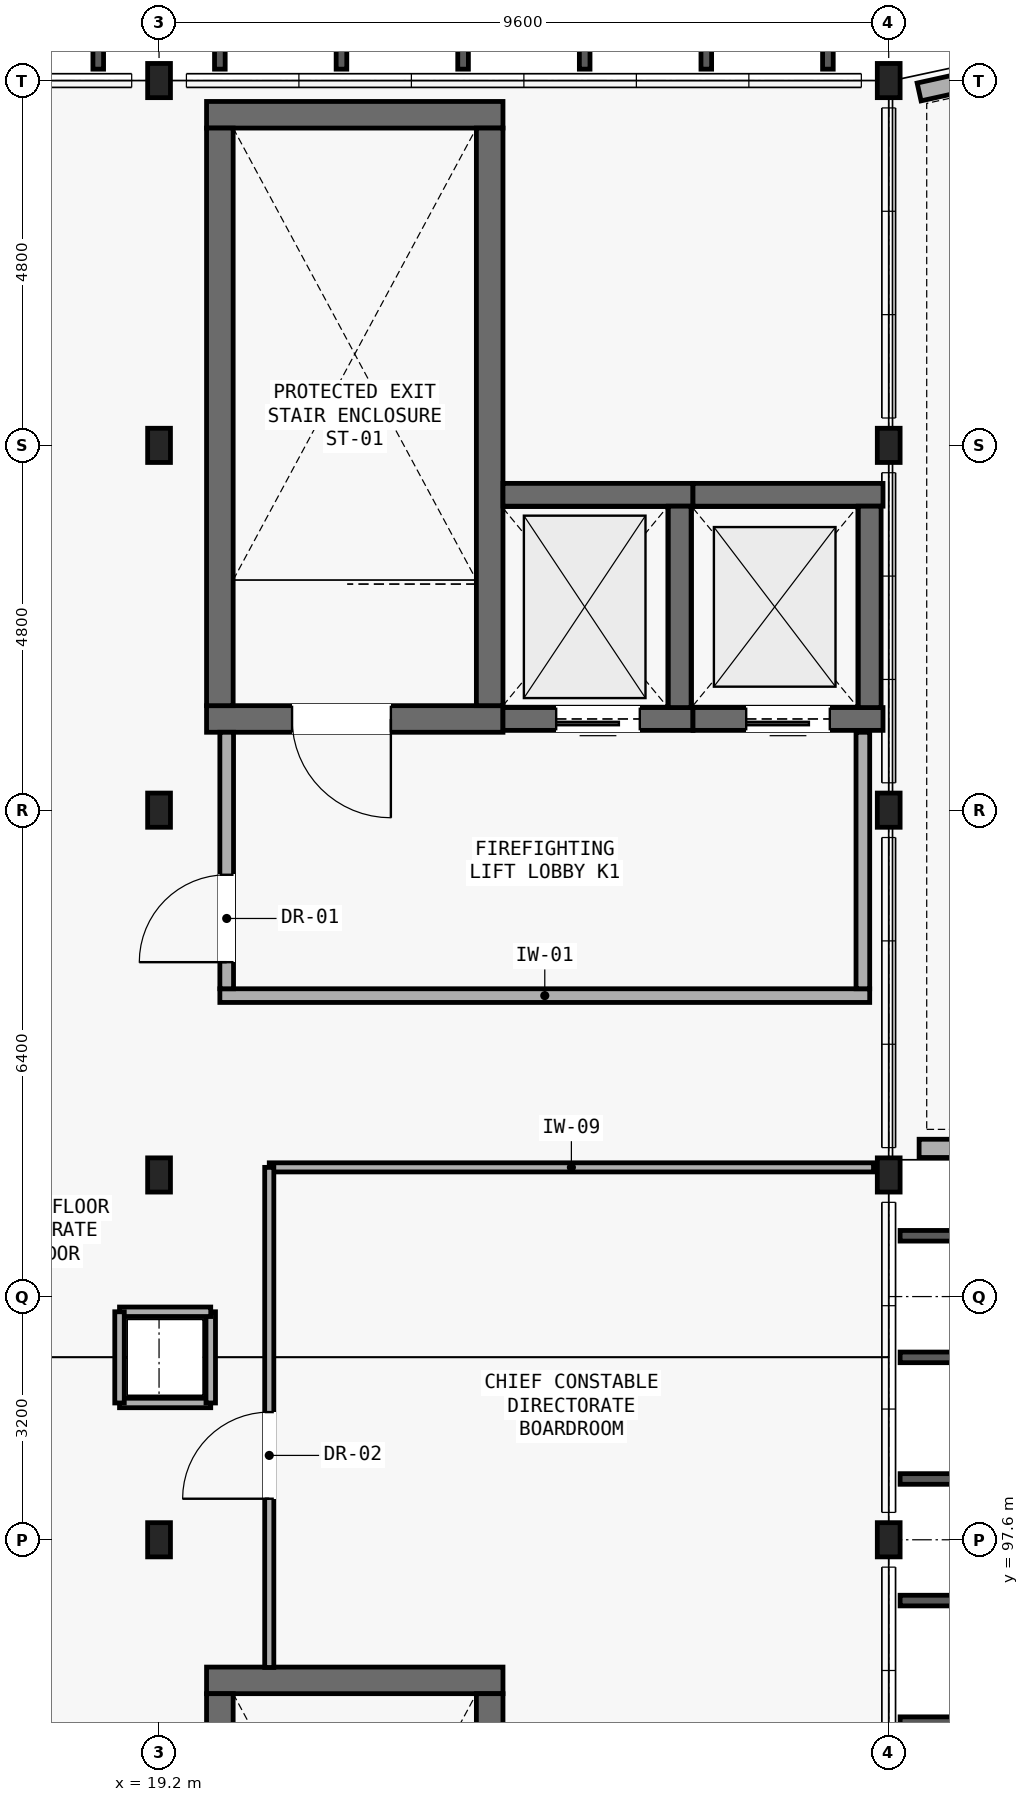
"""IFC4 building model, lengths in metres.
Left out: names, types, materials, properties, quantities, classifications, styles, units other than length and angle.
Written with IfcOpenShell. Run it as: python <this file> out.ifc"""

import sys

from ifc_helpers import new_model, si_unit, direction, frame, frame_2d, origin, origin_2d, place, context, subcontext, project, spatial, rectangle, i_section, extrude, element, fill, save


model = new_model("IFC4")
c1 = context("Model", 3, precision=1e-05, world=origin(), true_north=direction((0.0, 1.0)))
c2 = subcontext(c1, "Body", "Model", "MODEL_VIEW")
j1 = project(units=[si_unit("LENGTHUNIT", "METRE"), si_unit("PLANEANGLEUNIT", "RADIAN")], contexts=[c1])
p1 = place(None, origin())
s1 = spatial("IfcSite", under=j1, at=p1, CompositionType="ELEMENT")
p2 = place(p1, origin())
s2 = spatial("IfcBuilding", under=s1, at=p2, CompositionType="ELEMENT")
p3 = place(p2, frame((0.0, 0.0, 31.15)))
s3 = spatial("IfcBuildingStorey", under=s2, at=p3, CompositionType="ELEMENT", Elevation=31.15)
for number, where, z_axis, x_axis in (
    (1, (28.8, 97.6, 0.0), (0.0, 0.0, 1.0), (1.0, 0.0, 0.0)),
    (2, (28.8, 102.4, 0.0), (0.0, 0.0, 1.0), (1.0, 0.0, 0.0)),
    (3, (28.8, 107.2, 0.0), (0.0, 0.0, 1.0), (1.0, 0.0, 0.0)),
    (4, (28.8, 112.0, 0.0), (0.0, 0.0, 1.0), (1.0, 0.0, 0.0)),
    (5, (28.8, 116.8, 0.0), (0.0, 0.0, 1.0), (1.0, 0.0, 0.0)),
    (6, (19.2, 116.8, 0.0), (0.0, 0.0, 1.0), (1.0, 0.0, 0.0)),
    (7, (19.2, 97.6, 0.0), (0.0, 0.0, 1.0), (1.0, 0.0, 0.0)),
    (8, (19.2, 102.4, 0.0), (0.0, 0.0, 1.0), (1.0, 0.0, 0.0)),
    (9, (19.2, 107.2, 0.0), (0.0, 0.0, 1.0), (1.0, 0.0, 0.0)),
    (10, (19.2, 112.0, 0.0), (0.0, 0.0, 1.0), (1.0, 0.0, 0.0)),
):
    element("IfcColumn", number, at=place(p3, frame(where, z_axis=z_axis, x_axis=x_axis)), inside=s3, PredefinedType="COLUMN", context=c2, shape_type="SweptSolid", body=[
        extrude(i_section(OverallWidth=0.3, OverallDepth=0.45, WebThickness=0.014, FlangeThickness=0.026, FilletRadius=0.027, at=origin_2d()), origin(), (0.0, 0.0, 1.0), 4.9),
    ])
p4 = place(p3, frame((29.2, 102.75, 0.0), z_axis=(0.0, 0.0, 1.0), x_axis=(1.0, 0.0, 0.0)))
e11 = element("IfcWall", 11, at=p4, inside=s3, PredefinedType="PARAPET", context=c2, shape_type="SweptSolid", body=[
    extrude(rectangle(XDim=47.4, YDim=0.24, at=frame_2d((23.7, 0.0))), origin(), (0.0, 0.0, 1.0), 1.1),
])
p5 = place(p3, frame((38.4, 118.68, 0.0), z_axis=(0.0, 0.0, 1.0), x_axis=(-0.97650974299, -0.215473250881, 0.0)))
e12 = element("IfcWall", 12, at=p5, inside=s3, PredefinedType="PARAPET", context=c2, shape_type="SweptSolid", body=[
    extrude(rectangle(XDim=9.421, YDim=0.24, at=frame_2d((4.71, 0.0))), origin(), (0.0, 0.0, 1.0), 1.1),
])
p6 = place(p3, frame((19.825, 108.4, 0.0), z_axis=(0.0, 0.0, 1.0), x_axis=(1.0, 0.0, 0.0)))
e13 = element("IfcWall", 13, at=p6, inside=s3, PredefinedType="SHEAR", context=c2, shape_type="SweptSolid", body=[
    extrude(rectangle(XDim=3.9, YDim=0.35, at=frame_2d((1.95, 0.0))), origin(), (0.0, 0.0, 1.0), 4.71),
])
p7 = place(p6, frame((1.125, 0.0, 0.0)))
e14 = element("IfcOpeningElement", 14, at=p7, cuts=e13, PredefinedType="OPENING", context=c2, shape_type="SweptSolid", body=[
    extrude(rectangle(XDim=1.3, YDim=2.15, at=frame_2d((0.65, 1.075))), frame((0.0, 0.185, 0.0), z_axis=(0.0, -1.0, 0.0), x_axis=(1.0, 0.0, 0.0)), (0.0, 0.0, 1.0), 0.37),
])
p8 = place(p3, frame((19.825, 116.35, 0.0), z_axis=(0.0, 0.0, 1.0), x_axis=(1.0, 0.0, 0.0)))
e15 = element("IfcWall", 15, at=p8, inside=s3, PredefinedType="SHEAR", context=c2, shape_type="SweptSolid", body=[
    extrude(rectangle(XDim=3.9, YDim=0.35, at=frame_2d((1.95, 0.0))), origin(), (0.0, 0.0, 1.0), 4.71),
])
for number, where, z_axis, x_axis in (
    (16, (20.0, 108.575, 0.0), (0.0, 0.0, 1.0), (0.0, 1.0, 0.0)),
    (17, (23.55, 108.575, 0.0), (0.0, 0.0, 1.0), (0.0, 1.0, 0.0)),
):
    element("IfcWall", number, at=place(p3, frame(where, z_axis=z_axis, x_axis=x_axis)), inside=s3, PredefinedType="SHEAR", context=c2, shape_type="SweptSolid", body=[
        extrude(rectangle(XDim=7.6, YDim=0.35, at=frame_2d((3.8, 0.0))), origin(), (0.0, 0.0, 1.0), 4.71),
    ])
p9 = place(p3, frame((23.725, 108.4, 0.0), z_axis=(0.0, 0.0, 1.0), x_axis=(1.0, 0.0, 0.0)))
e18 = element("IfcWall", 18, at=p9, inside=s3, PredefinedType="SHEAR", context=c2, shape_type="SweptSolid", body=[
    extrude(rectangle(XDim=2.5, YDim=0.3, at=frame_2d((1.25, 0.0))), origin(), (0.0, 0.0, 1.0), 4.71),
])
p10 = place(p9, frame((0.7, 0.0, 0.0)))
e19 = element("IfcOpeningElement", 19, at=p10, cuts=e18, PredefinedType="OPENING", context=c2, shape_type="SweptSolid", body=[
    extrude(rectangle(XDim=1.1, YDim=2.1, at=frame_2d((0.55, 1.05))), frame((0.0, 0.16, 0.0), z_axis=(0.0, -1.0, 0.0), x_axis=(1.0, 0.0, 0.0)), (0.0, 0.0, 1.0), 0.32),
])
p11 = place(p3, frame((23.725, 111.35, 0.0), z_axis=(0.0, 0.0, 1.0), x_axis=(1.0, 0.0, 0.0)))
e20 = element("IfcWall", 20, at=p11, inside=s3, PredefinedType="SHEAR", context=c2, shape_type="SweptSolid", body=[
    extrude(rectangle(XDim=2.5, YDim=0.3, at=frame_2d((1.25, 0.0))), origin(), (0.0, 0.0, 1.0), 4.71),
])
p12 = place(p3, frame((26.05, 108.55, 0.0), z_axis=(0.0, 0.0, 1.0), x_axis=(0.0, 1.0, 0.0)))
e21 = element("IfcWall", 21, at=p12, inside=s3, PredefinedType="SHEAR", context=c2, shape_type="SweptSolid", body=[
    extrude(rectangle(XDim=2.65, YDim=0.3, at=frame_2d((1.325, 0.0))), origin(), (0.0, 0.0, 1.0), 4.71),
])
p13 = place(p3, frame((26.225, 108.4, 0.0), z_axis=(0.0, 0.0, 1.0), x_axis=(1.0, 0.0, 0.0)))
e22 = element("IfcWall", 22, at=p13, inside=s3, PredefinedType="SHEAR", context=c2, shape_type="SweptSolid", body=[
    extrude(rectangle(XDim=2.5, YDim=0.3, at=frame_2d((1.25, 0.0))), origin(), (0.0, 0.0, 1.0), 4.71),
])
p14 = place(p13, frame((0.7, 0.0, 0.0)))
e23 = element("IfcOpeningElement", 23, at=p14, cuts=e22, PredefinedType="OPENING", context=c2, shape_type="SweptSolid", body=[
    extrude(rectangle(XDim=1.1, YDim=2.1, at=frame_2d((0.55, 1.05))), frame((0.0, 0.16, 0.0), z_axis=(0.0, -1.0, 0.0), x_axis=(1.0, 0.0, 0.0)), (0.0, 0.0, 1.0), 0.32),
])
p15 = place(p3, frame((26.225, 111.35, 0.0), z_axis=(0.0, 0.0, 1.0), x_axis=(1.0, 0.0, 0.0)))
e24 = element("IfcWall", 24, at=p15, inside=s3, PredefinedType="SHEAR", context=c2, shape_type="SweptSolid", body=[
    extrude(rectangle(XDim=2.5, YDim=0.3, at=frame_2d((1.25, 0.0))), origin(), (0.0, 0.0, 1.0), 4.71),
])
p16 = place(p3, frame((28.55, 108.55, 0.0), z_axis=(0.0, 0.0, 1.0), x_axis=(0.0, 1.0, 0.0)))
e25 = element("IfcWall", 25, at=p16, inside=s3, PredefinedType="SHEAR", context=c2, shape_type="SweptSolid", body=[
    extrude(rectangle(XDim=2.65, YDim=0.3, at=frame_2d((1.325, 0.0))), origin(), (0.0, 0.0, 1.0), 4.71),
])
p17 = place(p3, frame((20.0, 104.76, 0.0), z_axis=(0.0, 0.0, 1.0), x_axis=(1.0, 0.0, 0.0)))
e26 = element("IfcWall", 26, at=p17, inside=s3, PredefinedType="PARTITIONING", context=c2, shape_type="SweptSolid", body=[
    extrude(rectangle(XDim=8.55, YDim=0.18, at=frame_2d((4.275, 0.0))), origin(), (0.0, 0.0, 1.0), 4.71),
])
p18 = place(p3, frame((20.09, 104.85, 0.0), z_axis=(0.0, 0.0, 1.0), x_axis=(0.0, 1.0, 0.0)))
e27 = element("IfcWall", 27, at=p18, inside=s3, PredefinedType="PARTITIONING", context=c2, shape_type="SweptSolid", body=[
    extrude(rectangle(XDim=3.375, YDim=0.18, at=frame_2d((1.688, 0.0))), origin(), (0.0, 0.0, 1.0), 4.71),
])
p19 = place(p18, frame((0.35, 0.0, 0.0)))
e28 = element("IfcOpeningElement", 28, at=p19, cuts=e27, PredefinedType="OPENING", context=c2, shape_type="SweptSolid", body=[
    extrude(rectangle(XDim=1.15, YDim=2.15, at=frame_2d((0.575, 1.075))), frame((0.0, 0.1, 0.0), z_axis=(0.0, -1.0, 0.0), x_axis=(1.0, 0.0, 0.0)), (0.0, 0.0, 1.0), 0.2),
])
p20 = place(p3, frame((28.46, 104.85, 0.0), z_axis=(0.0, 0.0, 1.0), x_axis=(0.0, 1.0, 0.0)))
e29 = element("IfcWall", 29, at=p20, inside=s3, PredefinedType="PARTITIONING", context=c2, shape_type="SweptSolid", body=[
    extrude(rectangle(XDim=3.375, YDim=0.18, at=frame_2d((1.688, 0.0))), origin(), (0.0, 0.0, 1.0), 4.71),
])
p21 = place(p3, frame((19.825, 95.75, 0.0), z_axis=(0.0, 0.0, 1.0), x_axis=(1.0, 0.0, 0.0)))
e30 = element("IfcWall", 30, at=p21, inside=s3, PredefinedType="SHEAR", context=c2, shape_type="SweptSolid", body=[
    extrude(rectangle(XDim=3.9, YDim=0.35, at=frame_2d((1.95, 0.0))), origin(), (0.0, 0.0, 1.0), 4.71),
])
for number, where, z_axis, x_axis in (
    (31, (20.0, 87.975, 0.0), (0.0, 0.0, 1.0), (0.0, 1.0, 0.0)),
    (32, (23.55, 87.975, 0.0), (0.0, 0.0, 1.0), (0.0, 1.0, 0.0)),
):
    element("IfcWall", number, at=place(p3, frame(where, z_axis=z_axis, x_axis=x_axis)), inside=s3, PredefinedType="SHEAR", context=c2, shape_type="SweptSolid", body=[
        extrude(rectangle(XDim=7.6, YDim=0.35, at=frame_2d((3.8, 0.0))), origin(), (0.0, 0.0, 1.0), 4.71),
    ])
p22 = place(p3, frame((18.68, 99.4, 0.0), z_axis=(0.0, 0.0, 1.0), x_axis=(1.0, 0.0, 0.0)))
e33 = element("IfcWall", 33, at=p22, inside=s3, PredefinedType="PARTITIONING", context=c2, shape_type="SweptSolid", body=[
    extrude(rectangle(XDim=1.2, YDim=0.125, at=frame_2d((0.6, 0.0))), origin(), (0.0, 0.0, 1.0), 4.71),
])
p23 = place(p3, frame((19.88, 99.4, 0.0), z_axis=(0.0, 0.0, 1.0), x_axis=(0.0, 1.0, 0.0)))
e34 = element("IfcWall", 34, at=p23, inside=s3, PredefinedType="PARTITIONING", context=c2, shape_type="SweptSolid", body=[
    extrude(rectangle(XDim=1.2, YDim=0.125, at=frame_2d((0.6, 0.0))), origin(), (0.0, 0.0, 1.0), 4.71),
])
p24 = place(p3, frame((19.88, 100.6, 0.0), z_axis=(0.0, 0.0, 1.0), x_axis=(-1.0, 0.0, 0.0)))
e35 = element("IfcWall", 35, at=p24, inside=s3, PredefinedType="PARTITIONING", context=c2, shape_type="SweptSolid", body=[
    extrude(rectangle(XDim=1.2, YDim=0.125, at=frame_2d((0.6, 0.0))), origin(), (0.0, 0.0, 1.0), 4.71),
])
p25 = place(p3, frame((18.68, 100.6, 0.0), z_axis=(0.0, 0.0, 1.0), x_axis=(0.0, -1.0, 0.0)))
e36 = element("IfcWall", 36, at=p25, inside=s3, PredefinedType="PARTITIONING", context=c2, shape_type="SweptSolid", body=[
    extrude(rectangle(XDim=1.2, YDim=0.125, at=frame_2d((0.6, 0.0))), origin(), (0.0, 0.0, 1.0), 4.71),
])
p26 = place(p3, frame((28.6, 102.5, 0.0), z_axis=(0.0, 0.0, 1.0), x_axis=(-1.0, 0.0, 0.0)))
e37 = element("IfcWall", 37, at=p26, inside=s3, PredefinedType="PARTITIONING", context=c2, shape_type="SweptSolid", body=[
    extrude(rectangle(XDim=7.95, YDim=0.12, at=frame_2d((3.975, 0.0))), origin(), (0.0, 0.0, 1.0), 3.89),
])
p27 = place(p3, frame((20.65, 102.5, 0.0), z_axis=(0.0, 0.0, 1.0), x_axis=(0.0, -1.0, 0.0)))
e38 = element("IfcWall", 38, at=p27, inside=s3, PredefinedType="PARTITIONING", context=c2, shape_type="SweptSolid", body=[
    extrude(rectangle(XDim=6.58, YDim=0.12, at=frame_2d((3.29, 0.0))), origin(), (0.0, 0.0, 1.0), 4.71),
])
p28 = place(p27, frame((3.22, 0.0, 0.0)))
e39 = element("IfcOpeningElement", 39, at=p28, cuts=e38, PredefinedType="OPENING", context=c2, shape_type="SweptSolid", body=[
    extrude(rectangle(XDim=1.14, YDim=2.15, at=frame_2d((0.57, 1.075))), frame((0.0, 0.07, 0.0), z_axis=(0.0, -1.0, 0.0), x_axis=(1.0, 0.0, 0.0)), (0.0, 0.0, 1.0), 0.14),
])
p29 = place(p7, frame((1.3, 0.0, 0.0), z_axis=(0.0, 0.0, 1.0), x_axis=(-1.0, 0.0, 0.0)))
e40 = element("IfcDoor", 40, at=p29, inside=s3, OperationType="SINGLE_SWING_RIGHT", PredefinedType="DOOR", context=c2, shape_type="SweptSolid", body=[
    extrude(rectangle(XDim=1.3, YDim=2.15, at=frame_2d((0.65, 1.075))), frame((0.0, 0.025, 0.0), z_axis=(0.0, -1.0, 0.0), x_axis=(1.0, 0.0, 0.0)), (0.0, 0.0, 1.0), 0.05),
])
fill(e14, e40)
p30 = place(p10, frame((1.1, 0.0, 0.0), z_axis=(0.0, 0.0, 1.0), x_axis=(-1.0, 0.0, 0.0)))
e41 = element("IfcDoor", 41, at=p30, inside=s3, OperationType="SLIDING_TO_LEFT", PredefinedType="DOOR", context=c2, shape_type="SweptSolid", body=[
    extrude(rectangle(XDim=1.1, YDim=2.1, at=frame_2d((0.55, 1.05))), frame((0.0, 0.025, 0.0), z_axis=(0.0, -1.0, 0.0), x_axis=(1.0, 0.0, 0.0)), (0.0, 0.0, 1.0), 0.05),
])
fill(e19, e41)
p31 = place(p14, frame((1.1, 0.0, 0.0), z_axis=(0.0, 0.0, 1.0), x_axis=(-1.0, 0.0, 0.0)))
e42 = element("IfcDoor", 42, at=p31, inside=s3, OperationType="SLIDING_TO_LEFT", PredefinedType="DOOR", context=c2, shape_type="SweptSolid", body=[
    extrude(rectangle(XDim=1.1, YDim=2.1, at=frame_2d((0.55, 1.05))), frame((0.0, 0.025, 0.0), z_axis=(0.0, -1.0, 0.0), x_axis=(1.0, 0.0, 0.0)), (0.0, 0.0, 1.0), 0.05),
])
fill(e23, e42)
p32 = place(p19, origin())
e43 = element("IfcDoor", 43, at=p32, inside=s3, OperationType="SINGLE_SWING_LEFT", PredefinedType="DOOR", context=c2, shape_type="SweptSolid", body=[
    extrude(rectangle(XDim=1.15, YDim=2.15, at=frame_2d((0.575, 1.075))), frame((0.0, 0.025, 0.0), z_axis=(0.0, -1.0, 0.0), x_axis=(1.0, 0.0, 0.0)), (0.0, 0.0, 1.0), 0.05),
])
fill(e28, e43)
p33 = place(p28, frame((1.14, 0.0, 0.0), z_axis=(0.0, 0.0, 1.0), x_axis=(-1.0, 0.0, 0.0)))
e44 = element("IfcDoor", 44, at=p33, inside=s3, OperationType="SINGLE_SWING_RIGHT", PredefinedType="DOOR", context=c2, shape_type="SweptSolid", body=[
    extrude(rectangle(XDim=1.14, YDim=2.15, at=frame_2d((0.57, 1.075))), frame((0.0, 0.025, 0.0), z_axis=(0.0, -1.0, 0.0), x_axis=(1.0, 0.0, 0.0)), (0.0, 0.0, 1.0), 0.05),
])
fill(e39, e44)
save(model, sys.argv[1])
